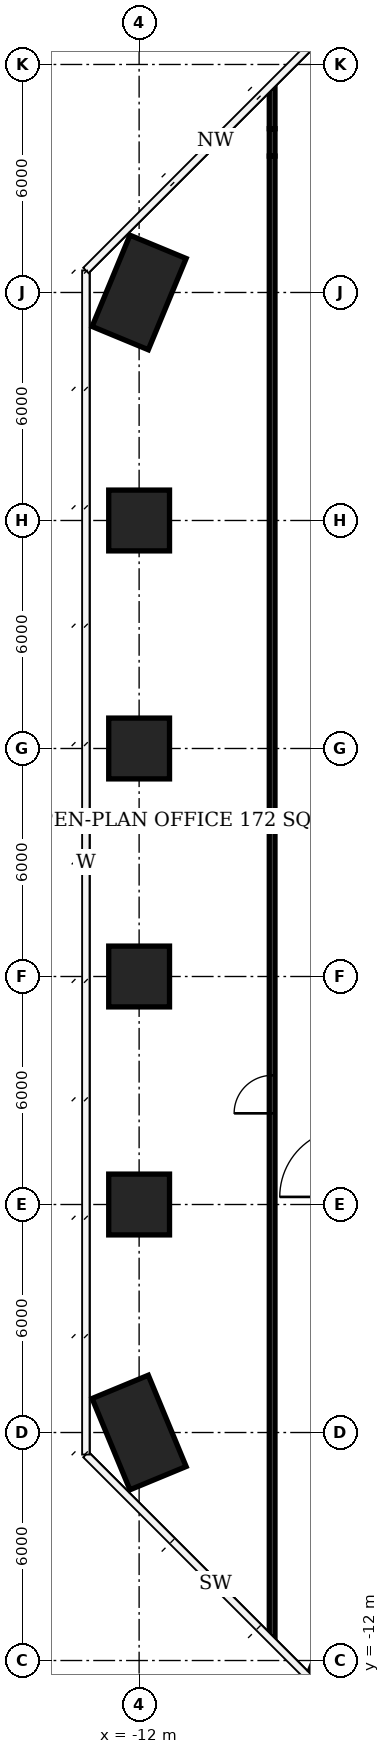
"""IFC4 building model, lengths in metres.
Left out: names, types, materials, properties, quantities, classifications, styles, units other than length and angle.
Written with IfcOpenShell. Run it as: python <this file> out.ifc"""

import sys

from ifc_helpers import new_model, si_unit, direction, frame, frame_2d, origin, origin_2d, place, context, subcontext, project, spatial, rectangle, extrude, element, fill, save


model = new_model("IFC4")
c1 = context("Model", 3, precision=1e-05, world=origin(), true_north=direction((0.0, 1.0)))
c2 = subcontext(c1, "Body", "Model", "MODEL_VIEW")
j1 = project(units=[si_unit("LENGTHUNIT", "METRE"), si_unit("PLANEANGLEUNIT", "RADIAN")], contexts=[c1])
p1 = place(None, origin())
s1 = spatial("IfcSite", under=j1, at=p1, CompositionType="ELEMENT")
p2 = place(p1, origin())
s2 = spatial("IfcBuilding", under=s1, at=p2, CompositionType="ELEMENT")
p3 = place(p2, frame((0.0, 0.0, 185.0)))
s3 = spatial("IfcBuildingStorey", under=s2, at=p3, CompositionType="ELEMENT", Elevation=185.0)
p4 = place(p3, frame((-12.0, -6.0, 0.0), z_axis=(0.0, 0.0, 1.0), x_axis=(-0.382683432365, 0.923879532511, 0.0)))
e1 = element("IfcColumn", 1, at=p4, inside=s3, PredefinedType="COLUMN", context=c2, shape_type="SweptSolid", body=[
    extrude(rectangle(XDim=2.6, YDim=1.6, at=origin_2d()), origin(), (0.0, 0.0, 1.0), 3.9),
])
for number, where, z_axis, x_axis in (
    (2, (-12.0, 0.0, 0.0), (0.0, 0.0, 1.0), (1.0, 0.0, 0.0)),
    (3, (-12.0, 6.0, 0.0), (0.0, 0.0, 1.0), (1.0, 0.0, 0.0)),
    (4, (-12.0, 12.0, 0.0), (0.0, 0.0, 1.0), (1.0, 0.0, 0.0)),
    (5, (-12.0, 18.0, 0.0), (0.0, 0.0, 1.0), (1.0, 0.0, 0.0)),
):
    element("IfcColumn", number, at=place(p3, frame(where, z_axis=z_axis, x_axis=x_axis)), inside=s3, PredefinedType="COLUMN", context=c2, shape_type="SweptSolid", body=[
        extrude(rectangle(XDim=1.6, YDim=1.6, at=origin_2d()), origin(), (0.0, 0.0, 1.0), 3.9),
    ])
for number, where, z_axis, x_axis in (
    (6, (-12.0, 24.0, 0.0), (0.0, 0.0, 1.0), (0.383, 0.924, 0.0)),
    (7, (-6.0, -12.0, 0.0), (0.0, 0.0, 1.0), (-0.924, 0.383, 0.0)),
):
    element("IfcColumn", number, at=place(p3, frame(where, z_axis=z_axis, x_axis=x_axis)), inside=s3, PredefinedType="COLUMN", context=c2, shape_type="SweptSolid", body=[
        extrude(rectangle(XDim=2.6, YDim=1.6, at=origin_2d()), origin(), (0.0, 0.0, 1.0), 3.9),
    ])
p5 = place(p3, frame((-8.5, -11.388, 0.0), z_axis=(0.0, 0.0, 1.0), x_axis=(0.0, 1.0, 0.0)))
e8 = element("IfcWall", 8, at=p5, inside=s3, PredefinedType="PARTITIONING", context=c2, shape_type="SweptSolid", body=[
    extrude(rectangle(XDim=38.978, YDim=0.15, at=frame_2d((19.489, 0.0))), origin(), (0.0, 0.0, 1.0), 3.65),
])
p6 = place(p5, frame((13.787, 0.0, 0.0)))
e9 = element("IfcOpeningElement", 9, at=p6, cuts=e8, PredefinedType="OPENING", context=c2, shape_type="SweptSolid", body=[
    extrude(rectangle(XDim=1.0, YDim=2.1, at=frame_2d((0.5, 1.05))), frame((0.0, 0.085, 0.0), z_axis=(0.0, -1.0, 0.0), x_axis=(1.0, 0.0, 0.0)), (0.0, 0.0, 1.0), 0.17),
])
p7 = place(p3, frame((-8.5, 27.59, 0.0), z_axis=(0.0, 0.0, 1.0), x_axis=(0.0, 1.0, 0.0)))
e10 = element("IfcWall", 10, at=p7, inside=s3, PredefinedType="PARTITIONING", context=c2, shape_type="SweptSolid", body=[
    extrude(rectangle(XDim=0.72, YDim=0.15, at=frame_2d((0.36, 0.0))), origin(), (0.0, 0.0, 1.0), 2.65),
])
p8 = place(p3, frame((-8.5, 28.31, 0.0), z_axis=(0.0, 0.0, 1.0), x_axis=(0.0, 1.0, 0.0)))
e11 = element("IfcWall", 11, at=p8, inside=s3, PredefinedType="PARTITIONING", context=c2, shape_type="SweptSolid", body=[
    extrude(rectangle(XDim=1.078, YDim=0.15, at=frame_2d((0.539, 0.0))), origin(), (0.0, 0.0, 1.0), 3.65),
])
p9 = place(p6, origin())
e12 = element("IfcDoor", 12, at=p9, inside=s3, OperationType="SINGLE_SWING_LEFT", PredefinedType="DOOR", context=c2, shape_type="SweptSolid", body=[
    extrude(rectangle(XDim=1.0, YDim=2.1, at=frame_2d((0.5, 1.05))), frame((0.0, 0.025, 0.0), z_axis=(0.0, -1.0, 0.0), x_axis=(1.0, 0.0, 0.0)), (0.0, 0.0, 1.0), 0.05),
])
fill(e9, e12)
save(model, sys.argv[1])
